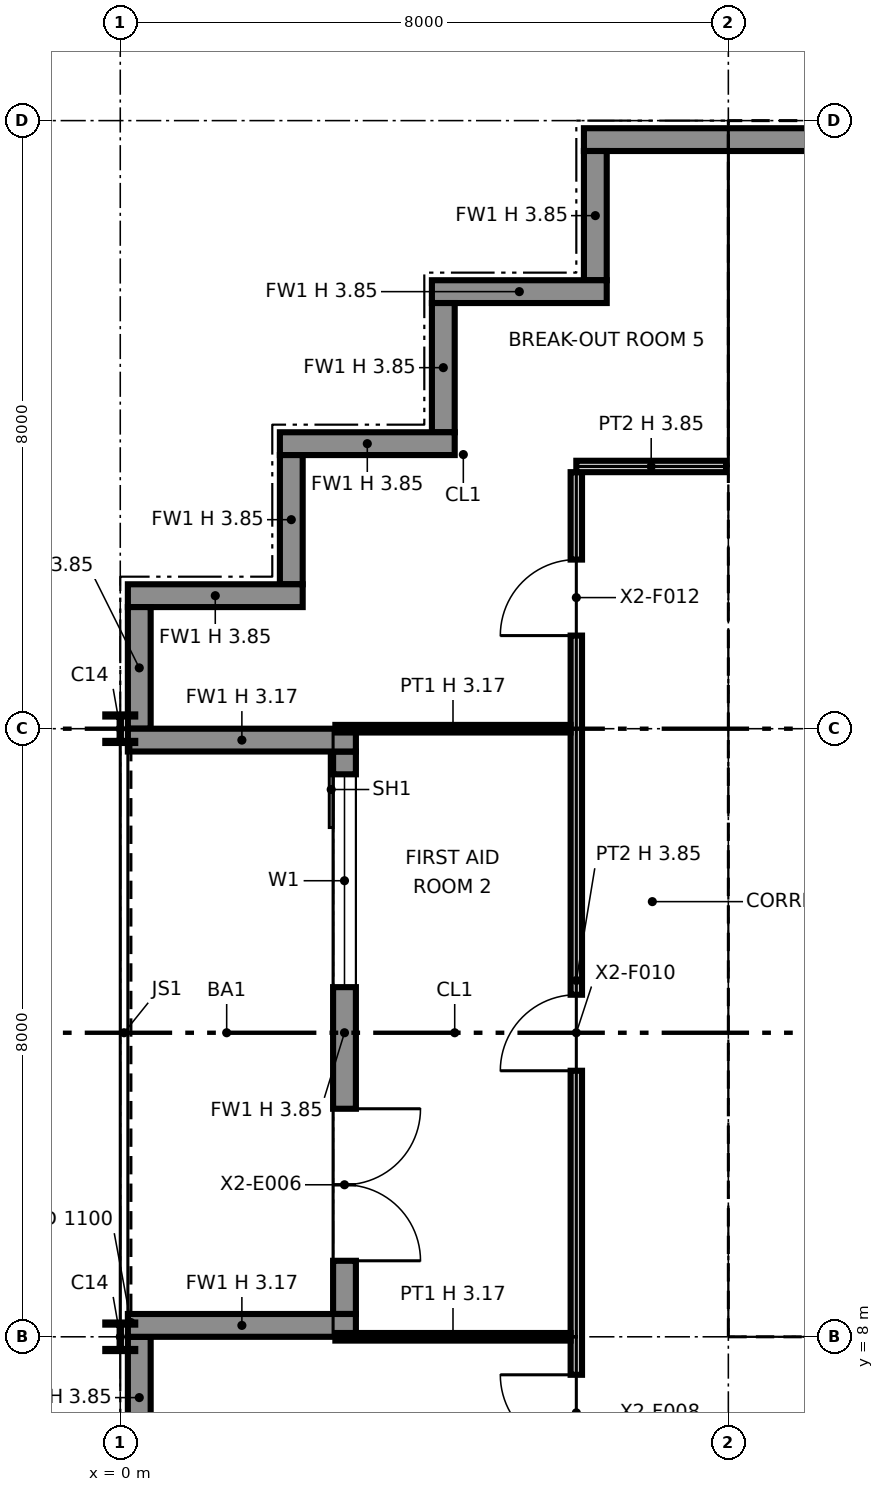
"""IFC4 building model, lengths in metres.
Left out: names, types, materials, properties, quantities, classifications, styles, units other than length and angle.
Written with IfcOpenShell. Run it as: python <this file> out.ifc"""

import sys

from ifc_helpers import new_model, si_unit, direction, frame, frame_2d, origin, origin_2d, place, context, subcontext, project, spatial, polyline, rectangle, i_section, outline, extrude, element, fill, save


model = new_model("IFC4")
c1 = context("Model", 3, precision=1e-05, world=origin(), true_north=direction((0.0, 1.0)))
c2 = subcontext(c1, "Body", "Model", "MODEL_VIEW")
j1 = project(units=[si_unit("LENGTHUNIT", "METRE"), si_unit("PLANEANGLEUNIT", "RADIAN")], contexts=[c1])
p1 = place(None, origin())
s1 = spatial("IfcSite", under=j1, at=p1, CompositionType="ELEMENT")
p2 = place(p1, origin())
s2 = spatial("IfcBuilding", under=s1, at=p2, CompositionType="ELEMENT")
p3 = place(p2, frame((0.0, 0.0, 263.0)))
s3 = spatial("IfcBuildingStorey", under=s2, at=p3, CompositionType="ELEMENT", Elevation=263.0)
for number, where, z_axis, x_axis in (
    (1, (0.0, 8.0, 0.0), (0.0, 0.0, 1.0), (1.0, 0.0, 0.0)),
    (2, (0.0, 16.0, 0.0), (0.0, 0.0, 1.0), (1.0, 0.0, 0.0)),
):
    element("IfcColumn", number, at=place(p3, frame(where, z_axis=z_axis, x_axis=x_axis)), inside=s3, PredefinedType="COLUMN", context=c2, shape_type="SweptSolid", body=[
        extrude(i_section(OverallWidth=0.394, OverallDepth=0.376, WebThickness=0.017, FlangeThickness=0.028, at=origin_2d()), origin(), (0.0, 0.0, 1.0), 3.85),
    ])
for number, where, z_axis, x_axis in (
    (3, (8.0, 8.0, 0.0), (0.0, 0.0, 1.0), (1.0, 0.0, 0.0)),
    (4, (8.0, 16.0, 0.0), (0.0, 0.0, 1.0), (1.0, 0.0, 0.0)),
):
    element("IfcColumn", number, at=place(p3, frame(where, z_axis=z_axis, x_axis=x_axis)), inside=s3, PredefinedType="COLUMN", context=c2, shape_type="SweptSolid", body=[
        extrude(i_section(OverallWidth=0.371, OverallDepth=0.361, WebThickness=0.012, FlangeThickness=0.02, at=origin_2d()), origin(), (0.0, 0.0, 1.0), 3.85),
    ])
p4 = place(p3, frame((8.0, 24.0, 0.0), z_axis=(0.0, 0.0, 1.0), x_axis=(1.0, 0.0, 0.0)))
e5 = element("IfcColumn", 5, at=p4, inside=s3, PredefinedType="COLUMN", context=c2, shape_type="SweptSolid", body=[
    extrude(i_section(OverallWidth=0.401, OverallDepth=0.399, WebThickness=0.025, FlangeThickness=0.04, at=origin_2d()), origin(), (0.0, 0.0, 1.0), 3.85),
])
p5 = place(p3, frame((32.0, 23.75, 0.0), z_axis=(0.0, 0.0, 1.0), x_axis=(-1.0, 0.0, 0.0)))
e6 = element("IfcWall", 6, at=p5, inside=s3, PredefinedType="SOLIDWALL", context=c2, shape_type="SweptSolid", body=[
    extrude(rectangle(XDim=25.9, YDim=0.3, at=frame_2d((12.95, 0.0))), origin(), (0.0, 0.0, 1.0), 3.85),
])
p6 = place(p3, frame((6.25, 23.6, 0.0), z_axis=(0.0, 0.0, 1.0), x_axis=(0.0, -1.0, 0.0)))
e7 = element("IfcWall", 7, at=p6, inside=s3, PredefinedType="SOLIDWALL", context=c2, shape_type="SweptSolid", body=[
    extrude(rectangle(XDim=1.7, YDim=0.3, at=frame_2d((0.85, 0.0))), origin(), (0.0, 0.0, 1.0), 3.85),
])
p7 = place(p3, frame((6.4, 21.75, 0.0), z_axis=(0.0, 0.0, 1.0), x_axis=(-1.0, 0.0, 0.0)))
e8 = element("IfcWall", 8, at=p7, inside=s3, PredefinedType="SOLIDWALL", context=c2, shape_type="SweptSolid", body=[
    extrude(rectangle(XDim=2.3, YDim=0.3, at=frame_2d((1.15, 0.0))), origin(), (0.0, 0.0, 1.0), 3.85),
])
p8 = place(p3, frame((4.25, 21.6, 0.0), z_axis=(0.0, 0.0, 1.0), x_axis=(0.0, -1.0, 0.0)))
e9 = element("IfcWall", 9, at=p8, inside=s3, PredefinedType="SOLIDWALL", context=c2, shape_type="SweptSolid", body=[
    extrude(rectangle(XDim=1.7, YDim=0.3, at=frame_2d((0.85, 0.0))), origin(), (0.0, 0.0, 1.0), 3.85),
])
p9 = place(p3, frame((4.4, 19.75, 0.0), z_axis=(0.0, 0.0, 1.0), x_axis=(-1.0, 0.0, 0.0)))
e10 = element("IfcWall", 10, at=p9, inside=s3, PredefinedType="SOLIDWALL", context=c2, shape_type="SweptSolid", body=[
    extrude(rectangle(XDim=2.3, YDim=0.3, at=frame_2d((1.15, 0.0))), origin(), (0.0, 0.0, 1.0), 3.85),
])
p10 = place(p3, frame((2.25, 19.6, 0.0), z_axis=(0.0, 0.0, 1.0), x_axis=(0.0, -1.0, 0.0)))
e11 = element("IfcWall", 11, at=p10, inside=s3, PredefinedType="SOLIDWALL", context=c2, shape_type="SweptSolid", body=[
    extrude(rectangle(XDim=1.7, YDim=0.3, at=frame_2d((0.85, 0.0))), origin(), (0.0, 0.0, 1.0), 3.85),
])
p11 = place(p3, frame((2.4, 17.75, 0.0), z_axis=(0.0, 0.0, 1.0), x_axis=(-1.0, 0.0, 0.0)))
e12 = element("IfcWall", 12, at=p11, inside=s3, PredefinedType="SOLIDWALL", context=c2, shape_type="SweptSolid", body=[
    extrude(rectangle(XDim=2.3, YDim=0.3, at=frame_2d((1.15, 0.0))), origin(), (0.0, 0.0, 1.0), 3.85),
])
p12 = place(p3, frame((0.25, 17.6, 0.0), z_axis=(0.0, 0.0, 1.0), x_axis=(0.0, -1.0, 0.0)))
e13 = element("IfcWall", 13, at=p12, inside=s3, PredefinedType="SOLIDWALL", context=c2, shape_type="SweptSolid", body=[
    extrude(rectangle(XDim=1.6, YDim=0.3, at=frame_2d((0.8, 0.0))), origin(), (0.0, 0.0, 1.0), 3.85),
])
p13 = place(p3, frame((2.95, 15.7, 0.0), z_axis=(0.0, 0.0, 1.0), x_axis=(0.0, -1.0, 0.0)))
e14 = element("IfcWall", 14, at=p13, inside=s3, PredefinedType="SOLIDWALL", context=c2, shape_type="SweptSolid", body=[
    extrude(rectangle(XDim=7.4, YDim=0.3, at=frame_2d((3.7, 0.0))), origin(), (0.0, 0.0, 1.0), 3.85),
])
p14 = place(p13, frame((0.3, 0.0, 0.9)))
e15 = element("IfcOpeningElement", 15, at=p14, cuts=e14, PredefinedType="OPENING", context=c2, shape_type="SweptSolid", body=[
    extrude(rectangle(XDim=2.8, YDim=2.2, at=frame_2d((1.4, 1.1))), frame((0.0, 0.16, 0.0), z_axis=(0.0, -1.0, 0.0), x_axis=(1.0, 0.0, 0.0)), (0.0, 0.0, 1.0), 0.32),
])
p15 = place(p13, frame((4.7, 0.0, 0.0)))
e16 = element("IfcOpeningElement", 16, at=p15, cuts=e14, PredefinedType="OPENING", context=c2, shape_type="SweptSolid", body=[
    extrude(rectangle(XDim=2.0, YDim=2.4, at=frame_2d((1.0, 1.2))), frame((0.0, 0.16, 0.0), z_axis=(0.0, -1.0, 0.0), x_axis=(1.0, 0.0, 0.0)), (0.0, 0.0, 1.0), 0.32),
])
for number, where, z_axis, x_axis in (
    (17, (0.1, 15.85, 0.0), (0.0, 0.0, 1.0), (1.0, 0.0, 0.0)),
    (18, (0.1, 8.15, 0.0), (0.0, 0.0, 1.0), (1.0, 0.0, 0.0)),
):
    element("IfcWall", number, at=place(p3, frame(where, z_axis=z_axis, x_axis=x_axis)), inside=s3, PredefinedType="SOLIDWALL", context=c2, shape_type="SweptSolid", body=[
        extrude(rectangle(XDim=3.0, YDim=0.3, at=frame_2d((1.5, 0.0))), origin(), (0.0, 0.0, 1.0), 3.171),
    ])
p16 = place(p3, frame((0.25, 8.0, 0.0), z_axis=(0.0, 0.0, 1.0), x_axis=(0.0, -1.0, 0.0)))
e19 = element("IfcWall", 19, at=p16, inside=s3, PredefinedType="SOLIDWALL", context=c2, shape_type="SweptSolid", body=[
    extrude(rectangle(XDim=1.6, YDim=0.3, at=frame_2d((0.8, 0.0))), origin(), (0.0, 0.0, 1.0), 3.85),
])
p17 = place(p3, frame((8.65, 8.75, 0.0), z_axis=(0.0, 0.0, 1.0), x_axis=(1.0, 0.0, 0.0)))
e20 = element("IfcWall", 20, at=p17, inside=s3, PredefinedType="PARTITIONING", context=c2, shape_type="SweptSolid", body=[
    extrude(outline(polyline([(0.0, 0.0), (14.7, 0.0), (14.7, 3.85), (7.438, 3.85), (7.438, 3.308), (7.262, 3.308), (7.261, 3.85), (0.0, 3.85), (0.0, 0.0)])), frame((0.0, 0.1, 0.0), z_axis=(0.0, -1.0, 0.0), x_axis=(1.0, 0.0, 0.0)), (0.0, 0.0, 1.0), 0.2),
])
p18 = place(p17, frame((1.3, 0.0, 0.0)))
e21 = element("IfcOpeningElement", 21, at=p18, cuts=e20, PredefinedType="OPENING", context=c2, shape_type="SweptSolid", body=[
    extrude(rectangle(XDim=1.4, YDim=2.1, at=frame_2d((0.7, 1.05))), frame((0.0, 0.11, 0.0), z_axis=(0.0, -1.0, 0.0), x_axis=(1.0, 0.0, 0.0)), (0.0, 0.0, 1.0), 0.22),
])
p19 = place(p17, frame((4.6, 0.0, 0.0)))
e22 = element("IfcOpeningElement", 22, at=p19, cuts=e20, PredefinedType="OPENING", context=c2, shape_type="SweptSolid", body=[
    extrude(rectangle(XDim=1.4, YDim=2.1, at=frame_2d((0.7, 1.05))), frame((0.0, 0.11, 0.0), z_axis=(0.0, -1.0, 0.0), x_axis=(1.0, 0.0, 0.0)), (0.0, 0.0, 1.0), 0.22),
])
p20 = place(p17, frame((10.4, 0.0, 0.0)))
e23 = element("IfcOpeningElement", 23, at=p20, cuts=e20, PredefinedType="OPENING", context=c2, shape_type="SweptSolid", body=[
    extrude(rectangle(XDim=1.2, YDim=2.1, at=frame_2d((0.6, 1.05))), frame((0.0, 0.11, 0.0), z_axis=(0.0, -1.0, 0.0), x_axis=(1.0, 0.0, 0.0)), (0.0, 0.0, 1.0), 0.22),
])
p21 = place(p3, frame((8.75, 8.85, 0.0), z_axis=(0.0, 0.0, 1.0), x_axis=(0.0, 1.0, 0.0)))
e24 = element("IfcWall", 24, at=p21, inside=s3, PredefinedType="PARTITIONING", context=c2, shape_type="SweptSolid", body=[
    extrude(outline(polyline([(0.0, 0.0), (14.3, 0.0), (14.3, 3.85), (10.225, 3.85), (10.224, 3.44), (10.076, 3.44), (10.075, 3.85), (7.239, 3.85), (7.238, 3.308), (7.062, 3.308), (7.062, 3.85), (0.0, 3.85), (0.0, 0.0)])), frame((0.0, 0.1, 0.0), z_axis=(0.0, -1.0, 0.0), x_axis=(1.0, 0.0, 0.0)), (0.0, 0.0, 1.0), 0.2),
])
p22 = place(p21, frame((8.3, 0.0, 0.0)))
e25 = element("IfcOpeningElement", 25, at=p22, cuts=e24, PredefinedType="OPENING", context=c2, shape_type="SweptSolid", body=[
    extrude(rectangle(XDim=1.8, YDim=2.1, at=frame_2d((0.9, 1.05))), frame((0.0, 0.11, 0.0), z_axis=(0.0, -1.0, 0.0), x_axis=(1.0, 0.0, 0.0)), (0.0, 0.0, 1.0), 0.22),
])
p23 = place(p3, frame((8.65, 23.25, 0.0), z_axis=(0.0, 0.0, 1.0), x_axis=(1.0, 0.0, 0.0)))
e26 = element("IfcWall", 26, at=p23, inside=s3, PredefinedType="PARTITIONING", context=c2, shape_type="SweptSolid", body=[
    extrude(outline(polyline([(0.0, 0.0), (14.7, 0.0), (14.7, 3.85), (7.438, 3.85), (7.438, 3.308), (7.262, 3.308), (7.261, 3.85), (0.0, 3.85), (0.0, 0.0)])), frame((0.0, 0.1, 0.0), z_axis=(0.0, -1.0, 0.0), x_axis=(1.0, 0.0, 0.0)), (0.0, 0.0, 1.0), 0.2),
])
p24 = place(p3, frame((8.85, 16.0, 0.0), z_axis=(0.0, 0.0, 1.0), x_axis=(1.0, 0.0, 0.0)))
e27 = element("IfcWall", 27, at=p24, inside=s3, PredefinedType="PARTITIONING", context=c2, shape_type="SweptSolid", body=[
    extrude(rectangle(XDim=6.954, YDim=0.6, at=frame_2d((3.477, 0.0))), origin(), (0.0, 0.0, 1.0), 3.308),
])
p25 = place(p3, frame((8.85, 19.9, 0.0), z_axis=(0.0, 0.0, 1.0), x_axis=(1.0, 0.0, 0.0)))
e28 = element("IfcWall", 28, at=p25, inside=s3, PredefinedType="PARTITIONING", context=c2, shape_type="SweptSolid", body=[
    extrude(outline(polyline([(0.0, 0.0), (14.3, 0.0), (14.3, 3.85), (7.239, 3.85), (7.238, 3.308), (7.062, 3.308), (7.062, 3.85), (0.0, 3.85), (0.0, 0.0)])), frame((0.0, 0.1, 0.0), z_axis=(0.0, -1.0, 0.0), x_axis=(1.0, 0.0, 0.0)), (0.0, 0.0, 1.0), 0.2),
])
p26 = place(p25, frame((2.125, 0.0, 0.0)))
e29 = element("IfcOpeningElement", 29, at=p26, cuts=e28, PredefinedType="OPENING", context=c2, shape_type="SweptSolid", body=[
    extrude(rectangle(XDim=0.9, YDim=2.1, at=frame_2d((0.45, 1.05))), frame((0.0, 0.11, 0.0), z_axis=(0.0, -1.0, 0.0), x_axis=(1.0, 0.0, 0.0)), (0.0, 0.0, 1.0), 0.22),
])
p27 = place(p25, frame((5.65, 0.0, 0.0)))
e30 = element("IfcOpeningElement", 30, at=p27, cuts=e28, PredefinedType="OPENING", context=c2, shape_type="SweptSolid", body=[
    extrude(rectangle(XDim=1.1, YDim=2.1, at=frame_2d((0.55, 1.05))), frame((0.0, 0.11, 0.0), z_axis=(0.0, -1.0, 0.0), x_axis=(1.0, 0.0, 0.0)), (0.0, 0.0, 1.0), 0.22),
])
p28 = place(p25, frame((7.95, 0.0, 0.0)))
e31 = element("IfcOpeningElement", 31, at=p28, cuts=e28, PredefinedType="OPENING", context=c2, shape_type="SweptSolid", body=[
    extrude(rectangle(XDim=1.1, YDim=2.1, at=frame_2d((0.55, 1.05))), frame((0.0, 0.11, 0.0), z_axis=(0.0, -1.0, 0.0), x_axis=(1.0, 0.0, 0.0)), (0.0, 0.0, 1.0), 0.22),
])
p29 = place(p25, frame((10.25, 0.0, 0.0)))
e32 = element("IfcOpeningElement", 32, at=p29, cuts=e28, PredefinedType="OPENING", context=c2, shape_type="SweptSolid", body=[
    extrude(rectangle(XDim=1.1, YDim=2.1, at=frame_2d((0.55, 1.05))), frame((0.0, 0.11, 0.0), z_axis=(0.0, -1.0, 0.0), x_axis=(1.0, 0.0, 0.0)), (0.0, 0.0, 1.0), 0.22),
])
p30 = place(p25, frame((12.625, 0.0, 0.0)))
e33 = element("IfcOpeningElement", 33, at=p30, cuts=e28, PredefinedType="OPENING", context=c2, shape_type="SweptSolid", body=[
    extrude(rectangle(XDim=1.1, YDim=2.1, at=frame_2d((0.55, 1.05))), frame((0.0, 0.11, 0.0), z_axis=(0.0, -1.0, 0.0), x_axis=(1.0, 0.0, 0.0)), (0.0, 0.0, 1.0), 0.22),
])
p31 = place(p3, frame((6.0, 6.0, 0.0), z_axis=(0.0, 0.0, 1.0), x_axis=(0.0, 1.0, 0.0)))
e34 = element("IfcWall", 34, at=p31, inside=s3, PredefinedType="PARTITIONING", context=c2, shape_type="SweptSolid", body=[
    extrude(outline(polyline([(0.0, 0.0), (13.375, 0.0), (13.375, 3.85), (10.3, 3.85), (10.298, 3.172), (9.702, 3.172), (9.7, 3.85), (6.3, 3.85), (6.298, 3.172), (5.702, 3.172), (5.7, 3.85), (2.3, 3.85), (2.298, 3.172), (1.702, 3.172), (1.7, 3.85), (0.0, 3.85), (0.0, 0.0)])), frame((0.0, 0.075, 0.0), z_axis=(0.0, -1.0, 0.0), x_axis=(1.0, 0.0, 0.0)), (0.0, 0.0, 1.0), 0.15),
])
p32 = place(p31, frame((0.5, 0.0, 0.0)))
e35 = element("IfcOpeningElement", 35, at=p32, cuts=e34, PredefinedType="OPENING", context=c2, shape_type="SweptSolid", body=[
    extrude(rectangle(XDim=1.0, YDim=2.1, at=frame_2d((0.5, 1.05))), frame((0.0, 0.085, 0.0), z_axis=(0.0, -1.0, 0.0), x_axis=(1.0, 0.0, 0.0)), (0.0, 0.0, 1.0), 0.17),
])
p33 = place(p31, frame((5.5, 0.0, 0.0)))
e36 = element("IfcOpeningElement", 36, at=p33, cuts=e34, PredefinedType="OPENING", context=c2, shape_type="SweptSolid", body=[
    extrude(rectangle(XDim=1.0, YDim=2.1, at=frame_2d((0.5, 1.05))), frame((0.0, 0.085, 0.0), z_axis=(0.0, -1.0, 0.0), x_axis=(1.0, 0.0, 0.0)), (0.0, 0.0, 1.0), 0.17),
])
p34 = place(p31, frame((11.225, 0.0, 0.0)))
e37 = element("IfcOpeningElement", 37, at=p34, cuts=e34, PredefinedType="OPENING", context=c2, shape_type="SweptSolid", body=[
    extrude(rectangle(XDim=1.0, YDim=2.1, at=frame_2d((0.5, 1.05))), frame((0.0, 0.085, 0.0), z_axis=(0.0, -1.0, 0.0), x_axis=(1.0, 0.0, 0.0)), (0.0, 0.0, 1.0), 0.17),
])
for number, where, z_axis, x_axis in (
    (38, (2.83, 8.0, 0.0), (0.0, 0.0, 1.0), (1.0, 0.0, 0.0)),
    (39, (2.83, 16.0, 0.0), (0.0, 0.0, 1.0), (1.0, 0.0, 0.0)),
):
    element("IfcWall", number, at=place(p3, frame(where, z_axis=z_axis, x_axis=x_axis)), inside=s3, PredefinedType="PARTITIONING", context=c2, shape_type="SweptSolid", body=[
        extrude(rectangle(XDim=3.095, YDim=0.1, at=frame_2d((1.547, 0.0))), origin(), (0.0, 0.0, 1.0), 3.172),
    ])
p35 = place(p3, frame((6.0, 19.45, 0.0), z_axis=(0.0, 0.0, 1.0), x_axis=(1.0, 0.0, 0.0)))
e40 = element("IfcWall", 40, at=p35, inside=s3, PredefinedType="PARTITIONING", context=c2, shape_type="SweptSolid", body=[
    extrude(rectangle(XDim=1.97, YDim=0.15, at=frame_2d((0.985, 0.0))), origin(), (0.0, 0.0, 1.0), 3.85),
])
p36 = place(p14, origin())
e41 = element("IfcWindow", 41, at=p36, inside=s3, PartitioningType="SINGLE_PANEL", PredefinedType="WINDOW", context=c2, shape_type="SweptSolid", body=[
    extrude(rectangle(XDim=2.8, YDim=2.2, at=frame_2d((1.4, 1.1))), frame((0.0, 0.03, 0.0), z_axis=(0.0, -1.0, 0.0), x_axis=(1.0, 0.0, 0.0)), (0.0, 0.0, 1.0), 0.06),
])
fill(e15, e41)
p37 = place(p15, origin())
e42 = element("IfcDoor", 42, at=p37, inside=s3, OperationType="DOUBLE_DOOR_SINGLE_SWING", PredefinedType="DOOR", context=c2, shape_type="SweptSolid", body=[
    extrude(rectangle(XDim=2.0, YDim=2.4, at=frame_2d((1.0, 1.2))), frame((0.0, 0.025, 0.0), z_axis=(0.0, -1.0, 0.0), x_axis=(1.0, 0.0, 0.0)), (0.0, 0.0, 1.0), 0.05),
])
fill(e16, e42)
p38 = place(p22, origin())
e43 = element("IfcDoor", 43, at=p38, inside=s3, OperationType="DOUBLE_DOOR_SINGLE_SWING", PredefinedType="NOTDEFINED", context=c2, shape_type="SweptSolid", body=[
    extrude(rectangle(XDim=1.8, YDim=2.1, at=frame_2d((0.9, 1.05))), frame((0.0, 0.025, 0.0), z_axis=(0.0, -1.0, 0.0), x_axis=(1.0, 0.0, 0.0)), (0.0, 0.0, 1.0), 0.05),
])
fill(e25, e43)
p39 = place(p32, origin())
e44 = element("IfcDoor", 44, at=p39, inside=s3, OperationType="SINGLE_SWING_RIGHT", PredefinedType="DOOR", context=c2, shape_type="SweptSolid", body=[
    extrude(rectangle(XDim=1.0, YDim=2.1, at=frame_2d((0.5, 1.05))), frame((0.0, 0.025, 0.0), z_axis=(0.0, -1.0, 0.0), x_axis=(1.0, 0.0, 0.0)), (0.0, 0.0, 1.0), 0.05),
])
fill(e35, e44)
p40 = place(p33, origin())
e45 = element("IfcDoor", 45, at=p40, inside=s3, OperationType="SINGLE_SWING_LEFT", PredefinedType="DOOR", context=c2, shape_type="SweptSolid", body=[
    extrude(rectangle(XDim=1.0, YDim=2.1, at=frame_2d((0.5, 1.05))), frame((0.0, 0.025, 0.0), z_axis=(0.0, -1.0, 0.0), x_axis=(1.0, 0.0, 0.0)), (0.0, 0.0, 1.0), 0.05),
])
fill(e36, e45)
p41 = place(p34, origin())
e46 = element("IfcDoor", 46, at=p41, inside=s3, OperationType="SINGLE_SWING_LEFT", PredefinedType="DOOR", context=c2, shape_type="SweptSolid", body=[
    extrude(rectangle(XDim=1.0, YDim=2.1, at=frame_2d((0.5, 1.05))), frame((0.0, 0.025, 0.0), z_axis=(0.0, -1.0, 0.0), x_axis=(1.0, 0.0, 0.0)), (0.0, 0.0, 1.0), 0.05),
])
fill(e37, e46)
save(model, sys.argv[1])
